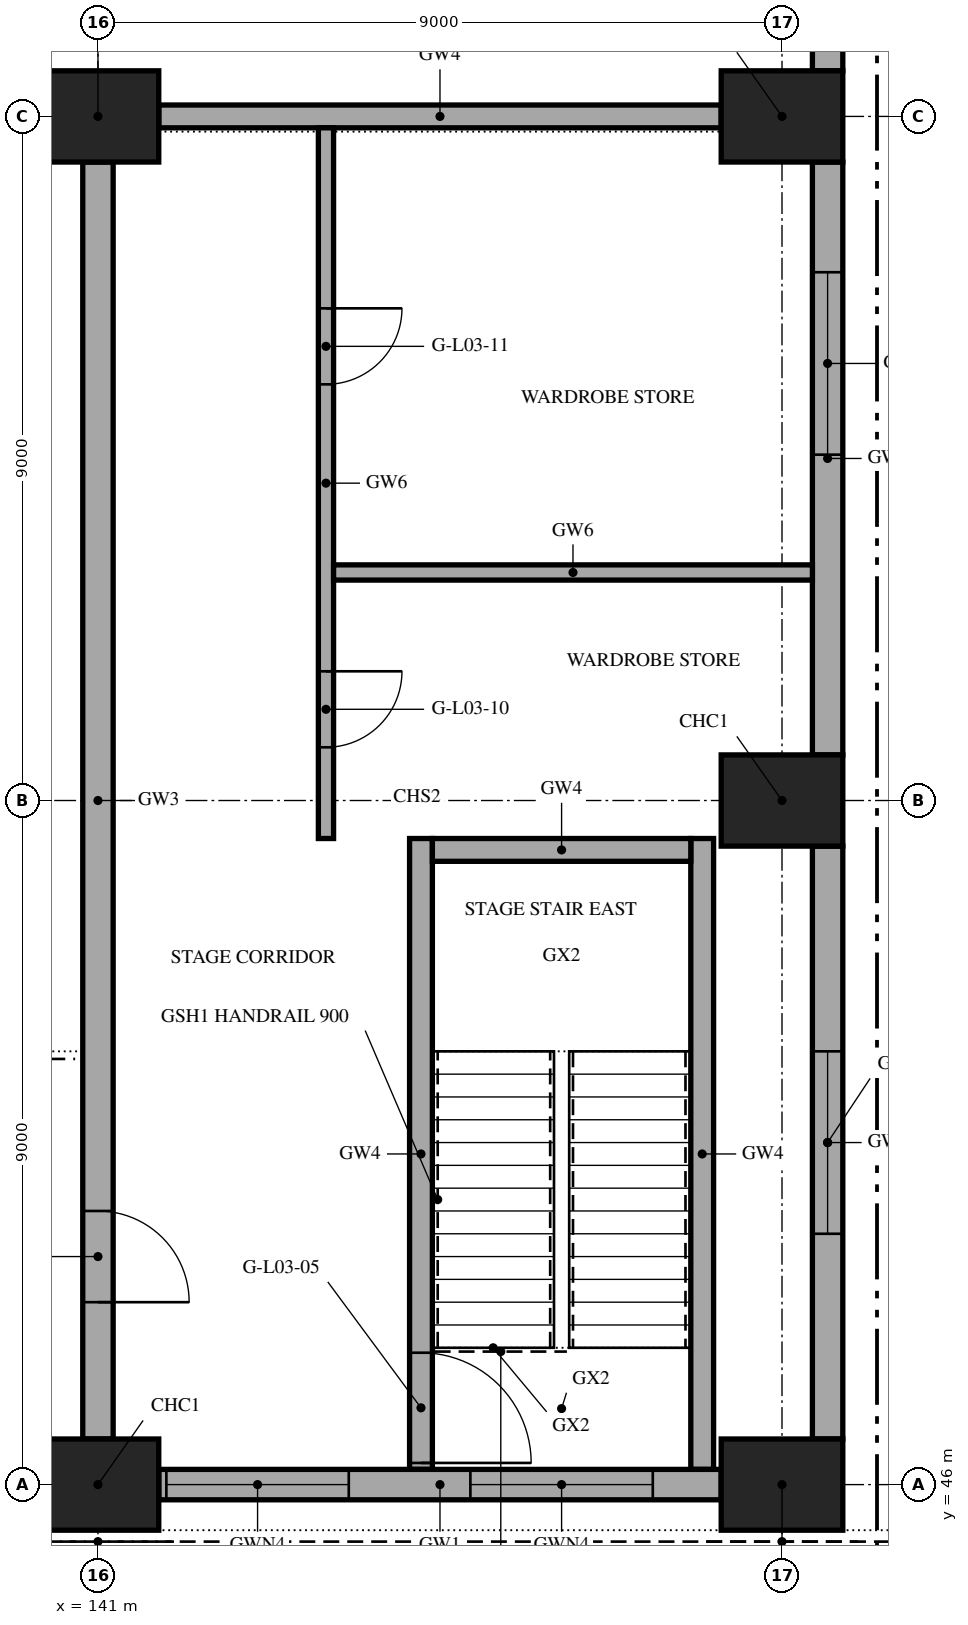
"""IFC4 building model, lengths in metres.
Left out: names, types, materials, properties, quantities, classifications, styles, units other than length and angle.
Written with IfcOpenShell. Run it as: python <this file> out.ifc"""

import sys

from ifc_helpers import new_model, si_unit, direction, frame, frame_2d, origin, origin_2d, place, context, subcontext, project, spatial, rectangle, extrude, element, fill, save


model = new_model("IFC4")
c1 = context("Model", 3, precision=1e-05, world=origin(), true_north=direction((0.0, 1.0)))
c2 = subcontext(c1, "Body", "Model", "MODEL_VIEW")
j1 = project(units=[si_unit("LENGTHUNIT", "METRE"), si_unit("PLANEANGLEUNIT", "RADIAN")], contexts=[c1])
p1 = place(None, origin())
s1 = spatial("IfcSite", under=j1, at=p1, CompositionType="ELEMENT")
p2 = place(p1, origin())
s2 = spatial("IfcBuilding", under=s1, at=p2, CompositionType="ELEMENT")
p3 = place(p2, frame((0.0, 0.0, 15.0)))
s3 = spatial("IfcBuildingStorey", under=s2, at=p3, CompositionType="ELEMENT", Elevation=15.0)
for number, where, z_axis, x_axis in (
    (1, (141.0, 46.0, 0.0), (0.0, 0.0, 1.0), (1.0, 0.0, 0.0)),
    (2, (150.0, 46.0, 0.0), (0.0, 0.0, 1.0), (1.0, 0.0, 0.0)),
    (3, (150.0, 55.0, 0.0), (0.0, 0.0, 1.0), (1.0, 0.0, 0.0)),
    (4, (141.0, 64.0, 0.0), (0.0, 0.0, 1.0), (1.0, 0.0, 0.0)),
    (5, (150.0, 64.0, 0.0), (0.0, 0.0, 1.0), (1.0, 0.0, 0.0)),
):
    element("IfcColumn", number, at=place(p3, frame(where, z_axis=z_axis, x_axis=x_axis)), inside=s3, PredefinedType="COLUMN", context=c2, shape_type="SweptSolid", body=[
        extrude(rectangle(XDim=1.6, YDim=1.2, at=origin_2d()), origin(), (0.0, 0.0, 1.0), 4.2),
    ])
p4 = place(p3, frame((141.0, 46.6, 0.0), z_axis=(0.0, 0.0, 1.0), x_axis=(0.0, 1.0, 0.0)))
e6 = element("IfcWall", 6, at=p4, inside=s3, PredefinedType="SHEAR", context=c2, shape_type="SweptSolid", body=[
    extrude(rectangle(XDim=16.8, YDim=0.4, at=frame_2d((8.4, 0.0))), origin(), (0.0, 0.0, 1.0), 4.2),
])
p5 = place(p4, frame((1.8, 0.0, 0.0)))
e7 = element("IfcOpeningElement", 7, at=p5, cuts=e6, PredefinedType="OPENING", context=c2, shape_type="SweptSolid", body=[
    extrude(rectangle(XDim=1.2, YDim=2.1, at=frame_2d((0.6, 1.05))), frame((0.0, 0.21, 0.0), z_axis=(0.0, -1.0, 0.0), x_axis=(1.0, 0.0, 0.0)), (0.0, 0.0, 1.0), 0.42),
])
p6 = place(p3, frame((141.8, 64.0, 0.0), z_axis=(0.0, 0.0, 1.0), x_axis=(1.0, 0.0, 0.0)))
e8 = element("IfcWall", 8, at=p6, inside=s3, PredefinedType="SHEAR", context=c2, shape_type="SweptSolid", body=[
    extrude(rectangle(XDim=7.4, YDim=0.3, at=frame_2d((3.7, 0.0))), origin(), (0.0, 0.0, 1.0), 4.2),
])
p7 = place(p3, frame((145.25, 46.2, 0.0), z_axis=(0.0, 0.0, 1.0), x_axis=(0.0, 1.0, 0.0)))
e9 = element("IfcWall", 9, at=p7, inside=s3, PredefinedType="SHEAR", context=c2, shape_type="SweptSolid", body=[
    extrude(rectangle(XDim=8.3, YDim=0.3, at=frame_2d((4.15, 0.0))), origin(), (0.0, 0.0, 1.0), 4.2),
])
p8 = place(p7, frame((0.085, 0.0, 0.0)))
e10 = element("IfcOpeningElement", 10, at=p8, cuts=e9, PredefinedType="OPENING", context=c2, shape_type="SweptSolid", body=[
    extrude(rectangle(XDim=1.45, YDim=2.1, at=frame_2d((0.725, 1.05))), frame((0.0, 0.16, 0.0), z_axis=(0.0, -1.0, 0.0), x_axis=(1.0, 0.0, 0.0)), (0.0, 0.0, 1.0), 0.32),
])
p9 = place(p3, frame((148.95, 46.2, 0.0), z_axis=(0.0, 0.0, 1.0), x_axis=(0.0, 1.0, 0.0)))
e11 = element("IfcWall", 11, at=p9, inside=s3, PredefinedType="SHEAR", context=c2, shape_type="SweptSolid", body=[
    extrude(rectangle(XDim=8.3, YDim=0.3, at=frame_2d((4.15, 0.0))), origin(), (0.0, 0.0, 1.0), 4.2),
])
p10 = place(p3, frame((145.4, 54.35, 0.0), z_axis=(0.0, 0.0, 1.0), x_axis=(1.0, 0.0, 0.0)))
e12 = element("IfcWall", 12, at=p10, inside=s3, PredefinedType="SHEAR", context=c2, shape_type="SweptSolid", body=[
    extrude(rectangle(XDim=3.4, YDim=0.3, at=frame_2d((1.7, 0.0))), origin(), (0.0, 0.0, 1.0), 4.2),
])
p11 = place(p3, frame((150.6, 46.6, 0.0), z_axis=(0.0, 0.0, 1.0), x_axis=(0.0, 1.0, 0.0)))
e13 = element("IfcWall", 13, at=p11, inside=s3, PredefinedType="SOLIDWALL", context=c2, shape_type="SweptSolid", body=[
    extrude(rectangle(XDim=7.8, YDim=0.4, at=frame_2d((3.9, 0.0))), origin(), (0.0, 0.0, 1.0), 4.2),
])
p12 = place(p11, frame((2.7, 0.0, 1.2)))
e14 = element("IfcOpeningElement", 14, at=p12, cuts=e13, PredefinedType="OPENING", context=c2, shape_type="SweptSolid", body=[
    extrude(rectangle(XDim=2.4, YDim=1.8, at=frame_2d((1.2, 0.9))), frame((0.0, 0.21, 0.0), z_axis=(0.0, -1.0, 0.0), x_axis=(1.0, 0.0, 0.0)), (0.0, 0.0, 1.0), 0.42),
])
p13 = place(p3, frame((150.6, 55.6, 0.0), z_axis=(0.0, 0.0, 1.0), x_axis=(0.0, 1.0, 0.0)))
e15 = element("IfcWall", 15, at=p13, inside=s3, PredefinedType="SOLIDWALL", context=c2, shape_type="SweptSolid", body=[
    extrude(rectangle(XDim=7.8, YDim=0.4, at=frame_2d((3.9, 0.0))), origin(), (0.0, 0.0, 1.0), 4.2),
])
p14 = place(p13, frame((3.95, 0.0, 1.2)))
e16 = element("IfcOpeningElement", 16, at=p14, cuts=e15, PredefinedType="OPENING", context=c2, shape_type="SweptSolid", body=[
    extrude(rectangle(XDim=2.4, YDim=1.8, at=frame_2d((1.2, 0.9))), frame((0.0, 0.21, 0.0), z_axis=(0.0, -1.0, 0.0), x_axis=(1.0, 0.0, 0.0)), (0.0, 0.0, 1.0), 0.42),
])
p15 = place(p3, frame((150.6, 64.6, 0.0), z_axis=(0.0, 0.0, 1.0), x_axis=(0.0, 1.0, 0.0)))
e17 = element("IfcWall", 17, at=p15, inside=s3, PredefinedType="SOLIDWALL", context=c2, shape_type="SweptSolid", body=[
    extrude(rectangle(XDim=7.8, YDim=0.4, at=frame_2d((3.9, 0.0))), origin(), (0.0, 0.0, 1.0), 4.2),
])
p16 = place(p3, frame((141.8, 46.0, 0.0), z_axis=(0.0, 0.0, 1.0), x_axis=(1.0, 0.0, 0.0)))
e18 = element("IfcWall", 18, at=p16, inside=s3, PredefinedType="SOLIDWALL", context=c2, shape_type="SweptSolid", body=[
    extrude(rectangle(XDim=7.4, YDim=0.4, at=frame_2d((3.7, 0.0))), origin(), (0.0, 0.0, 1.0), 4.2),
])
p17 = place(p16, frame((4.1, 0.0, 1.2)))
e19 = element("IfcOpeningElement", 19, at=p17, cuts=e18, PredefinedType="OPENING", context=c2, shape_type="SweptSolid", body=[
    extrude(rectangle(XDim=2.4, YDim=1.8, at=frame_2d((1.2, 0.9))), frame((0.0, 0.21, 0.0), z_axis=(0.0, -1.0, 0.0), x_axis=(1.0, 0.0, 0.0)), (0.0, 0.0, 1.0), 0.42),
])
p18 = place(p16, frame((0.1, 0.0, 1.2)))
e20 = element("IfcOpeningElement", 20, at=p18, cuts=e18, PredefinedType="OPENING", context=c2, shape_type="SweptSolid", body=[
    extrude(rectangle(XDim=2.4, YDim=1.8, at=frame_2d((1.2, 0.9))), frame((0.0, 0.21, 0.0), z_axis=(0.0, -1.0, 0.0), x_axis=(1.0, 0.0, 0.0)), (0.0, 0.0, 1.0), 0.42),
])
p19 = place(p3, frame((144.0, 54.5, 0.0), z_axis=(0.0, 0.0, 1.0), x_axis=(0.0, 1.0, 0.0)))
e21 = element("IfcWall", 21, at=p19, inside=s3, PredefinedType="PARTITIONING", context=c2, shape_type="SweptSolid", body=[
    extrude(rectangle(XDim=9.35, YDim=0.2, at=frame_2d((4.675, 0.0))), origin(), (0.0, 0.0, 1.0), 3.9),
])
p20 = place(p19, frame((1.2, 0.0, 0.0)))
e22 = element("IfcOpeningElement", 22, at=p20, cuts=e21, PredefinedType="OPENING", context=c2, shape_type="SweptSolid", body=[
    extrude(rectangle(XDim=1.0, YDim=2.1, at=frame_2d((0.5, 1.05))), frame((0.0, 0.11, 0.0), z_axis=(0.0, -1.0, 0.0), x_axis=(1.0, 0.0, 0.0)), (0.0, 0.0, 1.0), 0.22),
])
p21 = place(p19, frame((5.975, 0.0, 0.0)))
e23 = element("IfcOpeningElement", 23, at=p21, cuts=e21, PredefinedType="OPENING", context=c2, shape_type="SweptSolid", body=[
    extrude(rectangle(XDim=1.0, YDim=2.1, at=frame_2d((0.5, 1.05))), frame((0.0, 0.11, 0.0), z_axis=(0.0, -1.0, 0.0), x_axis=(1.0, 0.0, 0.0)), (0.0, 0.0, 1.0), 0.22),
])
p22 = place(p3, frame((144.1, 58.0, 0.0), z_axis=(0.0, 0.0, 1.0), x_axis=(1.0, 0.0, 0.0)))
e24 = element("IfcWall", 24, at=p22, inside=s3, PredefinedType="PARTITIONING", context=c2, shape_type="SweptSolid", body=[
    extrude(rectangle(XDim=6.3, YDim=0.2, at=frame_2d((3.15, 0.0))), origin(), (0.0, 0.0, 1.0), 3.9),
])
p23 = place(p17, origin())
e25 = element("IfcWindow", 25, at=p23, inside=s3, PartitioningType="SINGLE_PANEL", PredefinedType="WINDOW", context=c2, shape_type="SweptSolid", body=[
    extrude(rectangle(XDim=2.4, YDim=1.8, at=frame_2d((1.2, 0.9))), frame((0.0, 0.03, 0.0), z_axis=(0.0, -1.0, 0.0), x_axis=(1.0, 0.0, 0.0)), (0.0, 0.0, 1.0), 0.06),
])
fill(e19, e25)
p24 = place(p18, origin())
e26 = element("IfcWindow", 26, at=p24, inside=s3, PartitioningType="SINGLE_PANEL", PredefinedType="WINDOW", context=c2, shape_type="SweptSolid", body=[
    extrude(rectangle(XDim=2.4, YDim=1.8, at=frame_2d((1.2, 0.9))), frame((0.0, 0.03, 0.0), z_axis=(0.0, -1.0, 0.0), x_axis=(1.0, 0.0, 0.0)), (0.0, 0.0, 1.0), 0.06),
])
fill(e20, e26)
p25 = place(p12, origin())
e27 = element("IfcWindow", 27, at=p25, inside=s3, PartitioningType="SINGLE_PANEL", PredefinedType="WINDOW", context=c2, shape_type="SweptSolid", body=[
    extrude(rectangle(XDim=2.4, YDim=1.8, at=frame_2d((1.2, 0.9))), frame((0.0, 0.03, 0.0), z_axis=(0.0, -1.0, 0.0), x_axis=(1.0, 0.0, 0.0)), (0.0, 0.0, 1.0), 0.06),
])
fill(e14, e27)
p26 = place(p14, origin())
e28 = element("IfcWindow", 28, at=p26, inside=s3, PartitioningType="SINGLE_PANEL", PredefinedType="WINDOW", context=c2, shape_type="SweptSolid", body=[
    extrude(rectangle(XDim=2.4, YDim=1.8, at=frame_2d((1.2, 0.9))), frame((0.0, 0.03, 0.0), z_axis=(0.0, -1.0, 0.0), x_axis=(1.0, 0.0, 0.0)), (0.0, 0.0, 1.0), 0.06),
])
fill(e16, e28)
p27 = place(p8, frame((1.45, 0.0, 0.0), z_axis=(0.0, 0.0, 1.0), x_axis=(-1.0, 0.0, 0.0)))
e29 = element("IfcDoor", 29, at=p27, inside=s3, OperationType="SINGLE_SWING_RIGHT", PredefinedType="DOOR", context=c2, shape_type="SweptSolid", body=[
    extrude(rectangle(XDim=1.45, YDim=2.1, at=frame_2d((0.725, 1.05))), frame((0.0, 0.025, 0.0), z_axis=(0.0, -1.0, 0.0), x_axis=(1.0, 0.0, 0.0)), (0.0, 0.0, 1.0), 0.05),
])
fill(e10, e29)
p28 = place(p5, frame((1.2, 0.0, 0.0), z_axis=(0.0, 0.0, 1.0), x_axis=(-1.0, 0.0, 0.0)))
e30 = element("IfcDoor", 30, at=p28, inside=s3, OperationType="SINGLE_SWING_RIGHT", PredefinedType="DOOR", context=c2, shape_type="SweptSolid", body=[
    extrude(rectangle(XDim=1.2, YDim=2.1, at=frame_2d((0.6, 1.05))), frame((0.0, 0.025, 0.0), z_axis=(0.0, -1.0, 0.0), x_axis=(1.0, 0.0, 0.0)), (0.0, 0.0, 1.0), 0.05),
])
fill(e7, e30)
p29 = place(p20, frame((1.0, 0.0, 0.0), z_axis=(0.0, 0.0, 1.0), x_axis=(-1.0, 0.0, 0.0)))
e31 = element("IfcDoor", 31, at=p29, inside=s3, OperationType="SINGLE_SWING_LEFT", PredefinedType="DOOR", context=c2, shape_type="SweptSolid", body=[
    extrude(rectangle(XDim=1.0, YDim=2.1, at=frame_2d((0.5, 1.05))), frame((0.0, 0.025, 0.0), z_axis=(0.0, -1.0, 0.0), x_axis=(1.0, 0.0, 0.0)), (0.0, 0.0, 1.0), 0.05),
])
fill(e22, e31)
p30 = place(p21, frame((1.0, 0.0, 0.0), z_axis=(0.0, 0.0, 1.0), x_axis=(-1.0, 0.0, 0.0)))
e32 = element("IfcDoor", 32, at=p30, inside=s3, OperationType="SINGLE_SWING_LEFT", PredefinedType="DOOR", context=c2, shape_type="SweptSolid", body=[
    extrude(rectangle(XDim=1.0, YDim=2.1, at=frame_2d((0.5, 1.05))), frame((0.0, 0.025, 0.0), z_axis=(0.0, -1.0, 0.0), x_axis=(1.0, 0.0, 0.0)), (0.0, 0.0, 1.0), 0.05),
])
fill(e23, e32)
save(model, sys.argv[1])
